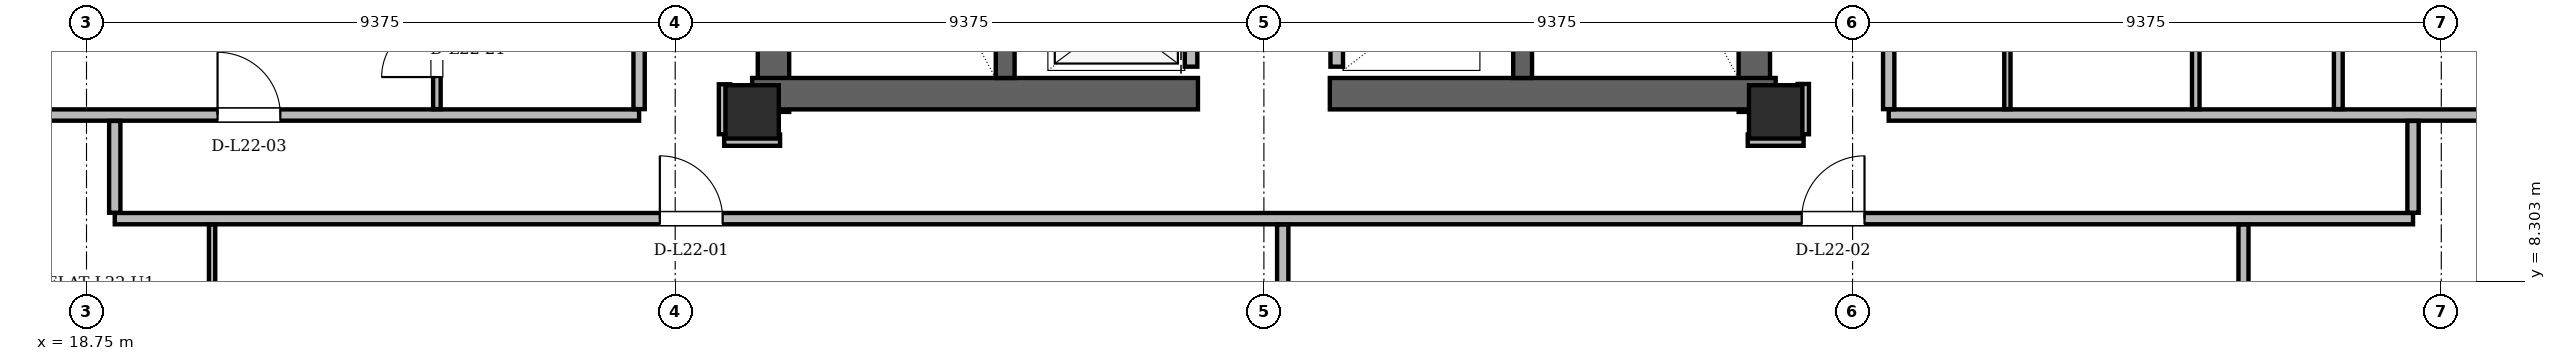
"""IFC4 building model, lengths in metres.
Left out: names, types, materials, properties, quantities, classifications, styles, units other than length and angle.
Written with IfcOpenShell. Run it as: python <this file> out.ifc"""

import sys

from ifc_helpers import new_model, si_unit, direction, frame, frame_2d, origin, origin_2d, place, context, subcontext, project, spatial, rectangle, hollow_rectangle, extrude, element, fill, save


model = new_model("IFC4")
c1 = context("Model", 3, precision=1e-05, world=origin(), true_north=direction((0.0, 1.0)))
c2 = subcontext(c1, "Body", "Model", "MODEL_VIEW")
j1 = project(units=[si_unit("LENGTHUNIT", "METRE"), si_unit("PLANEANGLEUNIT", "RADIAN")], contexts=[c1])
p1 = place(None, origin())
s1 = spatial("IfcSite", under=j1, at=p1, CompositionType="ELEMENT")
p2 = place(p1, origin())
s2 = spatial("IfcBuilding", under=s1, at=p2, CompositionType="ELEMENT")
p3 = place(p2, frame((0.0, 0.0, 86.1)))
s3 = spatial("IfcBuildingStorey", under=s2, at=p3, CompositionType="ELEMENT", Elevation=86.1)
for number, where, z_axis, x_axis in (
    (1, (29.35, 11.0, 0.0), (0.0, 0.0, 1.0), (1.0, 0.0, 0.0)),
    (2, (45.65, 11.0, 0.0), (0.0, 0.0, 1.0), (1.0, 0.0, 0.0)),
):
    element("IfcColumn", number, at=place(p3, frame(where, z_axis=z_axis, x_axis=x_axis)), inside=s3, PredefinedType="COLUMN", context=c2, shape_type="SweptSolid", body=[
        extrude(hollow_rectangle(XDim=0.85, YDim=0.85, WallThickness=0.07, at=origin_2d()), origin(), (0.0, 0.0, 1.0), 3.6),
    ])
for number, where, z_axis, x_axis in (
    (3, (29.69, 11.0, 0.0), (0.0, 0.0, 1.0), (0.0, 1.0, 0.0)),
    (4, (45.31, 11.0, 0.0), (0.0, 0.0, 1.0), (0.0, 1.0, 0.0)),
):
    element("IfcWall", number, at=place(p3, frame(where, z_axis=z_axis, x_axis=x_axis)), inside=s3, PredefinedType="SHEAR", context=c2, shape_type="SweptSolid", body=[
        extrude(rectangle(XDim=13.3, YDim=0.5, at=frame_2d((6.65, 0.0))), origin(), (0.0, 0.0, 1.0), 3.36),
    ])
for number, where, z_axis, x_axis in (
    (5, (29.35, 11.29, 0.0), (0.0, 0.0, 1.0), (1.0, 0.0, 0.0)),
    (6, (38.55, 11.29, 0.0), (0.0, 0.0, 1.0), (1.0, 0.0, 0.0)),
):
    element("IfcWall", number, at=place(p3, frame(where, z_axis=z_axis, x_axis=x_axis)), inside=s3, PredefinedType="SHEAR", context=c2, shape_type="SweptSolid", body=[
        extrude(rectangle(XDim=7.1, YDim=0.5, at=frame_2d((3.55, 0.0))), origin(), (0.0, 0.0, 1.0), 3.36),
    ])
for number, where, z_axis, x_axis in (
    (7, (33.38, 11.54, 0.0), (0.0, 0.0, 1.0), (0.0, 1.0, 0.0)),
    (8, (41.62, 11.54, 0.0), (0.0, 0.0, 1.0), (0.0, 1.0, 0.0)),
):
    element("IfcWall", number, at=place(p3, frame(where, z_axis=z_axis, x_axis=x_axis)), inside=s3, PredefinedType="SHEAR", context=c2, shape_type="SweptSolid", body=[
        extrude(rectangle(XDim=7.62, YDim=0.3, at=frame_2d((3.81, 0.0))), origin(), (0.0, 0.0, 1.0), 3.36),
    ])
for number, where, z_axis, x_axis in (
    (9, (14.083, 13.879, 0.0), (0.0, 0.0, 1.0), (0.5, -0.866, 0.0)),
    (10, (54.596, 2.93, 0.0), (0.0, 0.0, 1.0), (0.5, 0.866, 0.0)),
):
    element("IfcWall", number, at=place(p3, frame(where, z_axis=z_axis, x_axis=x_axis)), inside=s3, PredefinedType="SOLIDWALL", context=c2, shape_type="SweptSolid", body=[
        extrude(rectangle(XDim=12.643, YDim=0.34, at=frame_2d((6.321, 0.0))), origin(), (0.0, 0.0, 1.0), 2.578),
    ])
p4 = place(p3, frame((36.34, 11.72, 0.0), z_axis=(0.0, 0.0, 1.0), x_axis=(0.0, 1.0, 0.0)))
e11 = element("IfcWall", 11, at=p4, inside=s3, PredefinedType="PARTITIONING", context=c2, shape_type="SweptSolid", body=[
    extrude(rectangle(XDim=7.6, YDim=0.2, at=frame_2d((3.8, 0.0))), origin(), (0.0, 0.0, 1.0), 3.36),
])
p5 = place(p4, frame((0.255, 0.0, 0.0)))
e12 = element("IfcOpeningElement", 12, at=p5, cuts=e11, PredefinedType="OPENING", context=c2, shape_type="SweptSolid", body=[
    extrude(rectangle(XDim=1.05, YDim=2.15, at=frame_2d((0.525, 1.075))), frame((0.0, 0.1, 0.0), z_axis=(0.0, -1.0, 0.0), x_axis=(1.0, 0.0, 0.0)), (0.0, 0.0, 1.0), 0.2),
])
p6 = place(p4, frame((2.105, 0.0, 0.0)))
e13 = element("IfcOpeningElement", 13, at=p6, cuts=e11, PredefinedType="OPENING", context=c2, shape_type="SweptSolid", body=[
    extrude(rectangle(XDim=1.05, YDim=2.15, at=frame_2d((0.525, 1.075))), frame((0.0, 0.1, 0.0), z_axis=(0.0, -1.0, 0.0), x_axis=(1.0, 0.0, 0.0)), (0.0, 0.0, 1.0), 0.2),
])
p7 = place(p4, frame((3.955, 0.0, 0.0)))
e14 = element("IfcOpeningElement", 14, at=p7, cuts=e11, PredefinedType="OPENING", context=c2, shape_type="SweptSolid", body=[
    extrude(rectangle(XDim=1.05, YDim=2.15, at=frame_2d((0.525, 1.075))), frame((0.0, 0.1, 0.0), z_axis=(0.0, -1.0, 0.0), x_axis=(1.0, 0.0, 0.0)), (0.0, 0.0, 1.0), 0.2),
])
p8 = place(p3, frame((38.66, 11.72, 0.0), z_axis=(0.0, 0.0, 1.0), x_axis=(0.0, 1.0, 0.0)))
e15 = element("IfcWall", 15, at=p8, inside=s3, PredefinedType="PARTITIONING", context=c2, shape_type="SweptSolid", body=[
    extrude(rectangle(XDim=9.1, YDim=0.2, at=frame_2d((4.55, 0.0))), origin(), (0.0, 0.0, 1.0), 3.36),
])
p9 = place(p3, frame((19.2, 9.3, 0.0), z_axis=(0.0, 0.0, 1.0), x_axis=(1.0, 0.0, 0.0)))
e16 = element("IfcWall", 16, at=p9, inside=s3, PredefinedType="PARTITIONING", context=c2, shape_type="SweptSolid", body=[
    extrude(rectangle(XDim=36.6, YDim=0.18, at=frame_2d((18.3, 0.0))), origin(), (0.0, 0.0, 1.0), 2.814),
])
p10 = place(p9, frame((8.68, 0.0, 0.0)))
e17 = element("IfcOpeningElement", 17, at=p10, cuts=e16, PredefinedType="OPENING", context=c2, shape_type="SweptSolid", body=[
    extrude(rectangle(XDim=1.0, YDim=2.18, at=frame_2d((0.5, 1.09))), frame((0.0, 0.09, 0.0), z_axis=(0.0, -1.0, 0.0), x_axis=(1.0, 0.0, 0.0)), (0.0, 0.0, 1.0), 0.18),
])
p11 = place(p9, frame((26.865, 0.0, 0.0)))
e18 = element("IfcOpeningElement", 18, at=p11, cuts=e16, PredefinedType="OPENING", context=c2, shape_type="SweptSolid", body=[
    extrude(rectangle(XDim=1.0, YDim=2.18, at=frame_2d((0.5, 1.09))), frame((0.0, 0.09, 0.0), z_axis=(0.0, -1.0, 0.0), x_axis=(1.0, 0.0, 0.0)), (0.0, 0.0, 1.0), 0.18),
])
for number, where, z_axis, x_axis in (
    (19, (28.905, 10.55, 0.0), (0.0, 0.0, 1.0), (1.0, 0.0, 0.0)),
    (20, (45.205, 10.55, 0.0), (0.0, 0.0, 1.0), (1.0, 0.0, 0.0)),
):
    element("IfcWall", number, at=place(p3, frame(where, z_axis=z_axis, x_axis=x_axis)), inside=s3, PredefinedType="PARTITIONING", context=c2, shape_type="SweptSolid", body=[
        extrude(rectangle(XDim=0.89, YDim=0.18, at=frame_2d((0.445, 0.0))), origin(), (0.0, 0.0, 1.0), 3.36),
    ])
p12 = place(p3, frame((15.975, 10.95, 0.0), z_axis=(0.0, 0.0, 1.0), x_axis=(1.0, 0.0, 0.0)))
e21 = element("IfcWall", 21, at=p12, inside=s3, PredefinedType="PARTITIONING", context=c2, shape_type="SweptSolid", body=[
    extrude(rectangle(XDim=11.575, YDim=0.18, at=frame_2d((5.788, 0.0))), origin(), (0.0, 0.0, 1.0), 3.36),
])
p13 = place(p12, frame((4.862, 0.0, 0.0)))
e22 = element("IfcOpeningElement", 22, at=p13, cuts=e21, PredefinedType="OPENING", context=c2, shape_type="SweptSolid", body=[
    extrude(rectangle(XDim=1.0, YDim=2.18, at=frame_2d((0.5, 1.09))), frame((0.0, 0.09, 0.0), z_axis=(0.0, -1.0, 0.0), x_axis=(1.0, 0.0, 0.0)), (0.0, 0.0, 1.0), 0.18),
])
p14 = place(p3, frame((47.45, 10.95, 0.0), z_axis=(0.0, 0.0, 1.0), x_axis=(1.0, 0.0, 0.0)))
e23 = element("IfcWall", 23, at=p14, inside=s3, PredefinedType="PARTITIONING", context=c2, shape_type="SweptSolid", body=[
    extrude(rectangle(XDim=11.575, YDim=0.18, at=frame_2d((5.788, 0.0))), origin(), (0.0, 0.0, 1.0), 3.36),
])
p15 = place(p3, frame((19.2, 9.394, 0.0), z_axis=(0.0, 0.0, 1.0), x_axis=(0.0, 1.0, 0.0)))
e24 = element("IfcWall", 24, at=p15, inside=s3, PredefinedType="PARTITIONING", context=c2, shape_type="SweptSolid", body=[
    extrude(rectangle(XDim=1.462, YDim=0.18, at=frame_2d((0.731, 0.0))), origin(), (0.0, 0.0, 1.0), 3.36),
])
p16 = place(p3, frame((20.75, 3.104, 0.0), z_axis=(0.0, 0.0, 1.0), x_axis=(0.0, 1.0, 0.0)))
e25 = element("IfcWall", 25, at=p16, inside=s3, PredefinedType="PARTITIONING", context=c2, shape_type="SweptSolid", body=[
    extrude(rectangle(XDim=6.102, YDim=0.1, at=frame_2d((3.051, 0.0))), origin(), (0.0, 0.0, 1.0), 2.814),
])
p17 = place(p16, frame((2.646, 0.0, 0.0)))
e26 = element("IfcOpeningElement", 26, at=p17, cuts=e25, PredefinedType="OPENING", context=c2, shape_type="SweptSolid", body=[
    extrude(rectangle(XDim=0.88, YDim=2.08, at=frame_2d((0.44, 1.04))), frame((0.0, 0.05, 0.0), z_axis=(0.0, -1.0, 0.0), x_axis=(1.0, 0.0, 0.0)), (0.0, 0.0, 1.0), 0.1),
])
p18 = place(p3, frame((24.33, 11.044, 0.0), z_axis=(0.0, 0.0, 1.0), x_axis=(0.0, 1.0, 0.0)))
e27 = element("IfcWall", 27, at=p18, inside=s3, PredefinedType="PARTITIONING", context=c2, shape_type="SweptSolid", body=[
    extrude(rectangle(XDim=4.862, YDim=0.12, at=frame_2d((2.431, 0.0))), origin(), (0.0, 0.0, 1.0), 2.814),
])
p19 = place(p18, frame((0.511, 0.0, 0.0)))
e28 = element("IfcOpeningElement", 28, at=p19, cuts=e27, PredefinedType="OPENING", context=c2, shape_type="SweptSolid", body=[
    extrude(rectangle(XDim=0.88, YDim=2.08, at=frame_2d((0.44, 1.04))), frame((0.0, 0.06, 0.0), z_axis=(0.0, -1.0, 0.0), x_axis=(1.0, 0.0, 0.0)), (0.0, 0.0, 1.0), 0.12),
])
p20 = place(p18, frame((3.031, 0.0, 0.0)))
e29 = element("IfcOpeningElement", 29, at=p20, cuts=e27, PredefinedType="OPENING", context=c2, shape_type="SweptSolid", body=[
    extrude(rectangle(XDim=0.95, YDim=2.1, at=frame_2d((0.475, 1.05))), frame((0.0, 0.06, 0.0), z_axis=(0.0, -1.0, 0.0), x_axis=(1.0, 0.0, 0.0)), (0.0, 0.0, 1.0), 0.12),
])
p21 = place(p3, frame((27.55, 11.044, 0.0), z_axis=(0.0, 0.0, 1.0), x_axis=(0.0, 1.0, 0.0)))
e30 = element("IfcWall", 30, at=p21, inside=s3, PredefinedType="PARTITIONING", context=c2, shape_type="SweptSolid", body=[
    extrude(rectangle(XDim=14.832, YDim=0.18, at=frame_2d((7.416, 0.0))), origin(), (0.0, 0.0, 1.0), 2.814),
])
p22 = place(p21, frame((6.208, 0.0, 0.0)))
e31 = element("IfcOpeningElement", 31, at=p22, cuts=e30, PredefinedType="OPENING", context=c2, shape_type="SweptSolid", body=[
    extrude(rectangle(XDim=1.0, YDim=2.18, at=frame_2d((0.5, 1.09))), frame((0.0, 0.09, 0.0), z_axis=(0.0, -1.0, 0.0), x_axis=(1.0, 0.0, 0.0)), (0.0, 0.0, 1.0), 0.18),
])
p23 = place(p3, frame((28.91, 10.644, 0.0), z_axis=(0.0, 0.0, 1.0), x_axis=(0.0, 1.0, 0.0)))
e32 = element("IfcWall", 32, at=p23, inside=s3, PredefinedType="PARTITIONING", context=c2, shape_type="SweptSolid", body=[
    extrude(rectangle(XDim=0.796, YDim=0.18, at=frame_2d((0.398, 0.0))), origin(), (0.0, 0.0, 1.0), 2.814),
])
p24 = place(p3, frame((37.8, 3.104, 0.0), z_axis=(0.0, 0.0, 1.0), x_axis=(0.0, 1.0, 0.0)))
e33 = element("IfcWall", 33, at=p24, inside=s3, PredefinedType="PARTITIONING", context=c2, shape_type="SweptSolid", body=[
    extrude(rectangle(XDim=6.102, YDim=0.18, at=frame_2d((3.051, 0.0))), origin(), (0.0, 0.0, 1.0), 3.36),
])
p25 = place(p3, frame((46.09, 10.644, 0.0), z_axis=(0.0, 0.0, 1.0), x_axis=(0.0, 1.0, 0.0)))
e34 = element("IfcWall", 34, at=p25, inside=s3, PredefinedType="PARTITIONING", context=c2, shape_type="SweptSolid", body=[
    extrude(rectangle(XDim=0.801, YDim=0.18, at=frame_2d((0.4, 0.0))), origin(), (0.0, 0.0, 1.0), 2.814),
])
p26 = place(p3, frame((47.45, 11.044, 0.0), z_axis=(0.0, 0.0, 1.0), x_axis=(0.0, 1.0, 0.0)))
e35 = element("IfcWall", 35, at=p26, inside=s3, PredefinedType="PARTITIONING", context=c2, shape_type="SweptSolid", body=[
    extrude(rectangle(XDim=14.832, YDim=0.18, at=frame_2d((7.416, 0.0))), origin(), (0.0, 0.0, 1.0), 2.814),
])
p27 = place(p26, frame((4.578, 0.0, 0.0)))
e36 = element("IfcOpeningElement", 36, at=p27, cuts=e35, PredefinedType="OPENING", context=c2, shape_type="SweptSolid", body=[
    extrude(rectangle(XDim=1.0, YDim=2.18, at=frame_2d((0.5, 1.09))), frame((0.0, 0.09, 0.0), z_axis=(0.0, -1.0, 0.0), x_axis=(1.0, 0.0, 0.0)), (0.0, 0.0, 1.0), 0.18),
])
p28 = place(p26, frame((9.09, 0.0, 0.0)))
e37 = element("IfcOpeningElement", 37, at=p28, cuts=e35, PredefinedType="OPENING", context=c2, shape_type="SweptSolid", body=[
    extrude(rectangle(XDim=1.0, YDim=2.18, at=frame_2d((0.5, 1.09))), frame((0.0, 0.09, 0.0), z_axis=(0.0, -1.0, 0.0), x_axis=(1.0, 0.0, 0.0)), (0.0, 0.0, 1.0), 0.18),
])
p29 = place(p26, frame((13.539, 0.0, 0.0)))
e38 = element("IfcOpeningElement", 38, at=p29, cuts=e35, PredefinedType="OPENING", context=c2, shape_type="SweptSolid", body=[
    extrude(rectangle(XDim=1.0, YDim=2.18, at=frame_2d((0.5, 1.09))), frame((0.0, 0.09, 0.0), z_axis=(0.0, -1.0, 0.0), x_axis=(1.0, 0.0, 0.0)), (0.0, 0.0, 1.0), 0.18),
])
p30 = place(p3, frame((49.34, 11.044, 0.0), z_axis=(0.0, 0.0, 1.0), x_axis=(0.0, 1.0, 0.0)))
e39 = element("IfcWall", 39, at=p30, inside=s3, PredefinedType="PARTITIONING", context=c2, shape_type="SweptSolid", body=[
    extrude(rectangle(XDim=2.792, YDim=0.1, at=frame_2d((1.396, 0.0))), origin(), (0.0, 0.0, 1.0), 2.814),
])
p31 = place(p3, frame((52.34, 11.044, 0.0), z_axis=(0.0, 0.0, 1.0), x_axis=(0.0, 1.0, 0.0)))
e40 = element("IfcWall", 40, at=p31, inside=s3, PredefinedType="PARTITIONING", context=c2, shape_type="SweptSolid", body=[
    extrude(rectangle(XDim=2.792, YDim=0.12, at=frame_2d((1.396, 0.0))), origin(), (0.0, 0.0, 1.0), 2.814),
])
p32 = place(p3, frame((53.1, 3.104, 0.0), z_axis=(0.0, 0.0, 1.0), x_axis=(0.0, 1.0, 0.0)))
e41 = element("IfcWall", 41, at=p32, inside=s3, PredefinedType="PARTITIONING", context=c2, shape_type="SweptSolid", body=[
    extrude(rectangle(XDim=6.102, YDim=0.16, at=frame_2d((3.051, 0.0))), origin(), (0.0, 0.0, 1.0), 2.814),
])
p33 = place(p32, frame((2.646, 0.0, 0.0)))
e42 = element("IfcOpeningElement", 42, at=p33, cuts=e41, PredefinedType="OPENING", context=c2, shape_type="SweptSolid", body=[
    extrude(rectangle(XDim=0.88, YDim=2.08, at=frame_2d((0.44, 1.04))), frame((0.0, 0.08, 0.0), z_axis=(0.0, -1.0, 0.0), x_axis=(1.0, 0.0, 0.0)), (0.0, 0.0, 1.0), 0.16),
])
p34 = place(p3, frame((54.61, 11.044, 0.0), z_axis=(0.0, 0.0, 1.0), x_axis=(0.0, 1.0, 0.0)))
e43 = element("IfcWall", 43, at=p34, inside=s3, PredefinedType="PARTITIONING", context=c2, shape_type="SweptSolid", body=[
    extrude(rectangle(XDim=2.792, YDim=0.14, at=frame_2d((1.396, 0.0))), origin(), (0.0, 0.0, 1.0), 2.814),
])
p35 = place(p3, frame((55.8, 9.394, 0.0), z_axis=(0.0, 0.0, 1.0), x_axis=(0.0, 1.0, 0.0)))
e44 = element("IfcWall", 44, at=p35, inside=s3, PredefinedType="PARTITIONING", context=c2, shape_type="SweptSolid", body=[
    extrude(rectangle(XDim=1.462, YDim=0.18, at=frame_2d((0.731, 0.0))), origin(), (0.0, 0.0, 1.0), 3.36),
])
p36 = place(p10, origin())
e45 = element("IfcDoor", 45, at=p36, inside=s3, OperationType="SINGLE_SWING_LEFT", PredefinedType="DOOR", context=c2, shape_type="SweptSolid", body=[
    extrude(rectangle(XDim=1.0, YDim=2.18, at=frame_2d((0.5, 1.09))), frame((0.0, 0.025, 0.0), z_axis=(0.0, -1.0, 0.0), x_axis=(1.0, 0.0, 0.0)), (0.0, 0.0, 1.0), 0.05),
])
fill(e17, e45)
p37 = place(p11, origin())
e46 = element("IfcDoor", 46, at=p37, inside=s3, OperationType="SINGLE_SWING_RIGHT", PredefinedType="DOOR", context=c2, shape_type="SweptSolid", body=[
    extrude(rectangle(XDim=1.0, YDim=2.18, at=frame_2d((0.5, 1.09))), frame((0.0, 0.025, 0.0), z_axis=(0.0, -1.0, 0.0), x_axis=(1.0, 0.0, 0.0)), (0.0, 0.0, 1.0), 0.05),
])
fill(e18, e46)
p38 = place(p13, origin())
e47 = element("IfcDoor", 47, at=p38, inside=s3, OperationType="SINGLE_SWING_LEFT", PredefinedType="DOOR", context=c2, shape_type="SweptSolid", body=[
    extrude(rectangle(XDim=1.0, YDim=2.18, at=frame_2d((0.5, 1.09))), frame((0.0, 0.025, 0.0), z_axis=(0.0, -1.0, 0.0), x_axis=(1.0, 0.0, 0.0)), (0.0, 0.0, 1.0), 0.05),
])
fill(e22, e47)
p39 = place(p19, origin())
e48 = element("IfcDoor", 48, at=p39, inside=s3, OperationType="SINGLE_SWING_LEFT", PredefinedType="DOOR", context=c2, shape_type="SweptSolid", body=[
    extrude(rectangle(XDim=0.88, YDim=2.08, at=frame_2d((0.44, 1.04))), frame((0.0, 0.025, 0.0), z_axis=(0.0, -1.0, 0.0), x_axis=(1.0, 0.0, 0.0)), (0.0, 0.0, 1.0), 0.05),
])
fill(e28, e48)
save(model, sys.argv[1])
